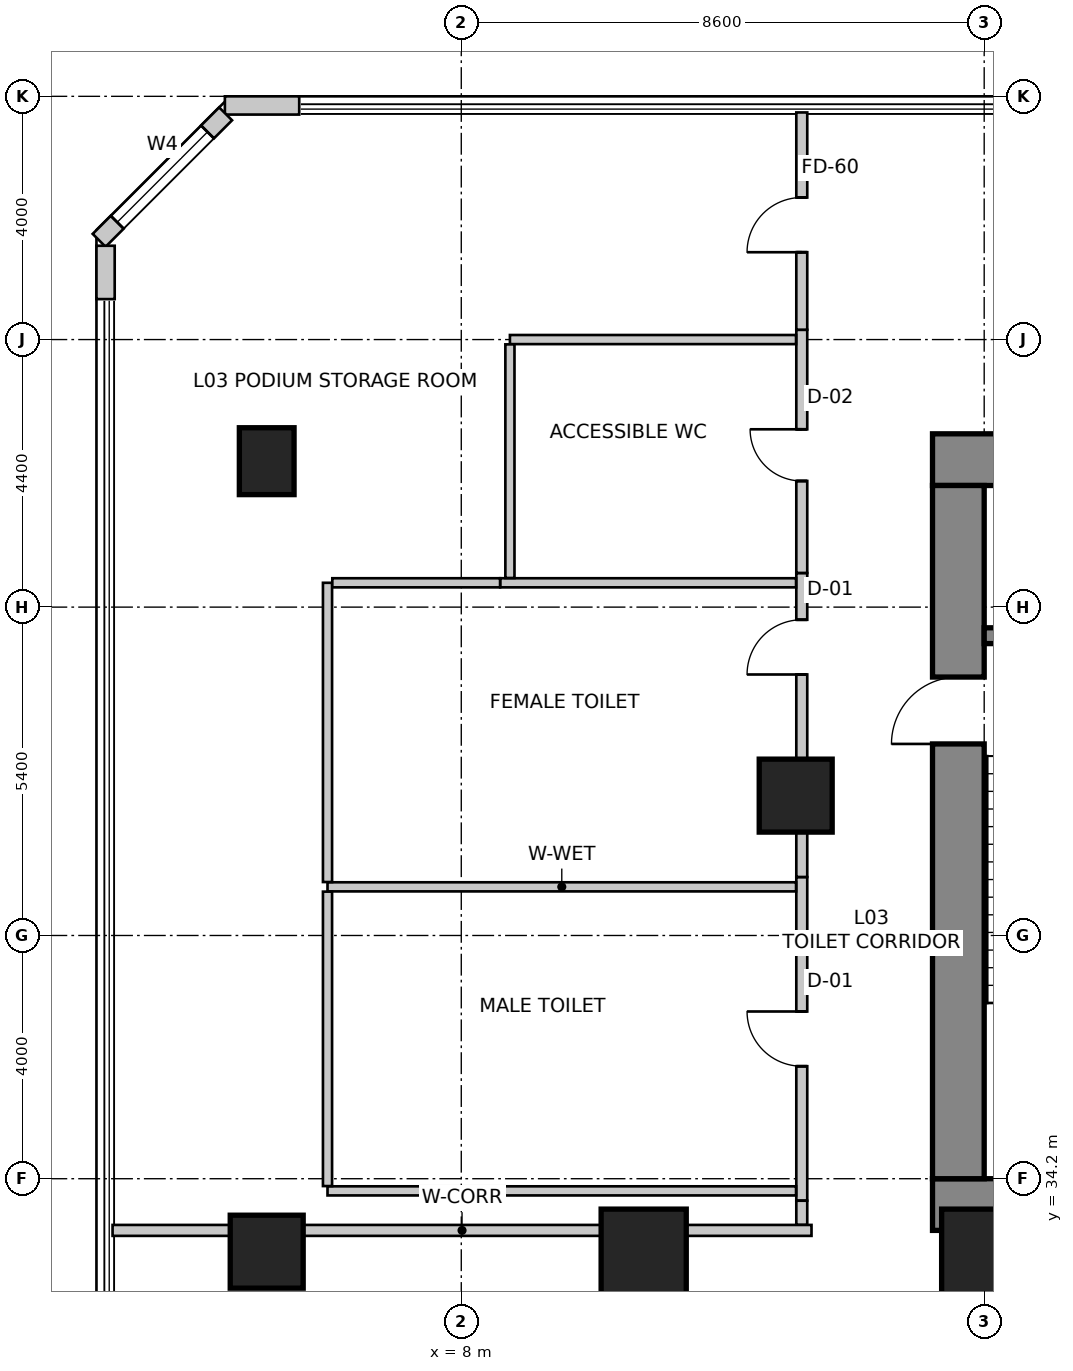
"""IFC4 building model, lengths in metres.
Left out: names, types, materials, properties, quantities, classifications, styles, units other than length and angle.
Written with IfcOpenShell. Run it as: python <this file> out.ifc"""

import sys

from ifc_helpers import new_model, si_unit, direction, frame, frame_2d, origin, origin_2d, place, context, subcontext, project, spatial, rectangle, extrude, source, transform, mapped, element, fill, save


model = new_model("IFC4")
c1 = context("Model", 3, precision=1e-05, world=origin(), true_north=direction((0.0, 1.0)))
c2 = subcontext(c1, "Body", "Model", "MODEL_VIEW")
j1 = project(units=[si_unit("LENGTHUNIT", "METRE"), si_unit("PLANEANGLEUNIT", "RADIAN")], contexts=[c1])
p1 = place(None, origin())
s1 = spatial("IfcSite", under=j1, at=p1, CompositionType="ELEMENT")
p2 = place(p1, origin())
s2 = spatial("IfcBuilding", under=s1, at=p2, CompositionType="ELEMENT")
p3 = place(p2, frame((0.0, 0.0, 11.2)))
s3 = spatial("IfcBuildingStorey", under=s2, at=p3, CompositionType="ELEMENT", Elevation=11.2)
p4 = place(p3, frame((15.75, 46.025, 0.0), z_axis=(0.0, 0.0, 1.0), x_axis=(1.0, 0.0, 0.0)))
e1 = element("IfcWall", 1, at=p4, inside=s3, PredefinedType="SHEAR", context=c2, shape_type="SweptSolid", body=[
    extrude(rectangle(XDim=16.1, YDim=0.85, at=frame_2d((8.05, 0.0))), origin(), (0.0, 0.0, 1.0), 5.2),
])
p5 = place(p3, frame((15.75, 33.775, 0.0), z_axis=(0.0, 0.0, 1.0), x_axis=(1.0, 0.0, 0.0)))
e2 = element("IfcWall", 2, at=p5, inside=s3, PredefinedType="SHEAR", context=c2, shape_type="SweptSolid", body=[
    extrude(rectangle(XDim=16.1, YDim=0.85, at=frame_2d((8.05, 0.0))), origin(), (0.0, 0.0, 1.0), 5.2),
])
m1 = source(origin(), c2, "Body", "SweptSolid", [
    extrude(rectangle(XDim=1.3, YDim=2.15, at=frame_2d((0.65, 1.075))), frame((0.0, 0.435, 0.0), z_axis=(0.0, -1.0, 0.0), x_axis=(1.0, 0.0, 0.0)), (0.0, 0.0, 1.0), 0.87),
])
p6 = place(p5, frame((10.18, 0.0, 0.0)))
e3 = element("IfcOpeningElement", 3, at=p6, cuts=e2, PredefinedType="OPENING", context=c2, shape_type="MappedRepresentation", body=[
    mapped(m1, transform((0.0, 0.0, 0.0), scale=1.0)),
])
p7 = place(p3, frame((16.175, 34.2, 0.0), z_axis=(0.0, 0.0, 1.0), x_axis=(0.0, 1.0, 0.0)))
e4 = element("IfcWall", 4, at=p7, inside=s3, PredefinedType="SHEAR", context=c2, shape_type="SweptSolid", body=[
    extrude(rectangle(XDim=11.4, YDim=0.85, at=frame_2d((5.7, 0.0))), origin(), (0.0, 0.0, 1.0), 5.2),
])
m2 = source(origin(), c2, "Body", "SweptSolid", [
    extrude(rectangle(XDim=1.1, YDim=2.15, at=frame_2d((0.55, 1.075))), frame((0.0, 0.435, 0.0), z_axis=(0.0, -1.0, 0.0), x_axis=(1.0, 0.0, 0.0)), (0.0, 0.0, 1.0), 0.87),
])
p8 = place(p7, frame((7.15, 0.0, 0.0)))
e5 = element("IfcOpeningElement", 5, at=p8, cuts=e4, PredefinedType="OPENING", context=c2, shape_type="MappedRepresentation", body=[
    mapped(m2, transform((0.0, 0.0, 0.0), scale=1.0)),
])
p9 = place(p3, frame((16.6, 43.13, 0.0), z_axis=(0.0, 0.0, 1.0), x_axis=(1.0, 0.0, 0.0)))
e6 = element("IfcWall", 6, at=p9, inside=s3, PredefinedType="SHEAR", context=c2, shape_type="SweptSolid", body=[
    extrude(rectangle(XDim=3.5, YDim=0.26, at=frame_2d((1.75, 0.0))), origin(), (0.0, 0.0, 1.0), 5.2),
])
m3 = source(origin(), c2, "Body", "SweptSolid", [
    extrude(rectangle(XDim=1.2, YDim=1.2, at=origin_2d()), origin(), (0.0, 0.0, 1.0), 5.2),
])
p10 = place(p3, frame((4.8, 33.0, 0.0), z_axis=(0.0, 0.0, 1.0), x_axis=(1.0, 0.0, 0.0)))
e7 = element("IfcColumn", 7, at=p10, inside=s3, PredefinedType="COLUMN", context=c2, shape_type="MappedRepresentation", body=[
    mapped(m3, transform((0.0, 0.0, 0.0), scale=1.0)),
])
m4 = source(origin(), c2, "Body", "SweptSolid", [
    extrude(rectangle(XDim=1.4, YDim=1.4, at=origin_2d()), origin(), (0.0, 0.0, 1.0), 5.2),
])
for number, where, z_axis, x_axis in (
    (8, (11.0, 33.0, 0.0), (0.0, 0.0, 1.0), (1.0, 0.0, 0.0)),
    (9, (16.6, 33.0, 0.0), (0.0, 0.0, 1.0), (1.0, 0.0, 0.0)),
):
    element("IfcColumn", number, at=place(p3, frame(where, z_axis=z_axis, x_axis=x_axis)), inside=s3, PredefinedType="COLUMN", context=c2, shape_type="MappedRepresentation", body=[
        mapped(m4, transform((0.0, 0.0, 0.0), scale=1.0)),
    ])
m5 = source(origin(), c2, "Body", "SweptSolid", [
    extrude(rectangle(XDim=0.9, YDim=1.1, at=origin_2d()), origin(), (0.0, 0.0, 1.0), 5.2),
])
p11 = place(p3, frame((4.8, 46.0, 0.0), z_axis=(0.0, 0.0, 1.0), x_axis=(1.0, 0.0, 0.0)))
e10 = element("IfcColumn", 10, at=p11, inside=s3, PredefinedType="COLUMN", context=c2, shape_type="MappedRepresentation", body=[
    mapped(m5, transform((0.0, 0.0, 0.0), scale=1.0)),
])
p12 = place(p3, frame((13.5, 40.5, 0.0), z_axis=(0.0, 0.0, 1.0), x_axis=(1.0, 0.0, 0.0)))
e11 = element("IfcColumn", 11, at=p12, inside=s3, PredefinedType="COLUMN", context=c2, shape_type="MappedRepresentation", body=[
    mapped(m3, transform((0.0, 0.0, 0.0), scale=1.0)),
])
p13 = place(p3, frame((5.335, 51.85, 0.0), z_axis=(0.0, 0.0, 1.0), x_axis=(-1.0, 0.0, 0.0)))
e12 = element("IfcWall", 12, at=p13, inside=s3, PredefinedType="SOLIDWALL", context=c2, shape_type="SweptSolid", body=[
    extrude(rectangle(XDim=1.223, YDim=0.3, at=frame_2d((0.611, 0.0))), origin(), (0.0, 0.0, 1.0), 4.9),
])
p14 = place(p3, frame((4.124, 51.712, 0.0), z_axis=(0.0, 0.0, 1.0), x_axis=(-0.707106781187, -0.707106781187, 0.0)))
e13 = element("IfcWall", 13, at=p14, inside=s3, PredefinedType="SOLIDWALL", context=c2, shape_type="SweptSolid", body=[
    extrude(rectangle(XDim=2.942, YDim=0.3, at=frame_2d((1.471, 0.0))), origin(), (0.0, 0.0, 1.0), 4.9),
])
m6 = source(origin(), c2, "Body", "SweptSolid", [
    extrude(rectangle(XDim=2.1, YDim=2.0, at=frame_2d((1.05, 1.0))), frame((0.0, 0.16, 0.0), z_axis=(0.0, -1.0, 0.0), x_axis=(1.0, 0.0, 0.0)), (0.0, 0.0, 1.0), 0.32),
])
p15 = place(p14, frame((0.421, 0.0, 0.85)))
e14 = element("IfcOpeningElement", 14, at=p15, cuts=e13, PredefinedType="OPENING", context=c2, shape_type="MappedRepresentation", body=[
    mapped(m6, transform((0.0, 0.0, 0.0), scale=1.0)),
])
p16 = place(p3, frame((2.15, 49.543, 0.0), z_axis=(0.0, 0.0, 1.0), x_axis=(0.0, -1.0, 0.0)))
e15 = element("IfcWall", 15, at=p16, inside=s3, PredefinedType="SOLIDWALL", context=c2, shape_type="SweptSolid", body=[
    extrude(rectangle(XDim=0.877, YDim=0.3, at=frame_2d((0.439, 0.0))), origin(), (0.0, 0.0, 1.0), 4.9),
])
p17 = place(p3, frame((2.265, 33.35, 0.0), z_axis=(0.0, 0.0, 1.0), x_axis=(1.0, 0.0, 0.0)))
e16 = element("IfcWall", 16, at=p17, inside=s3, PredefinedType="PARTITIONING", context=c2, shape_type="SweptSolid", body=[
    extrude(rectangle(XDim=11.495, YDim=0.18, at=frame_2d((5.748, 0.0))), origin(), (0.0, 0.0, 1.0), 3.692),
])
p18 = place(p3, frame((13.6, 33.84, 0.0), z_axis=(0.0, 0.0, 1.0), x_axis=(0.0, 1.0, 0.0)))
e17 = element("IfcWall", 17, at=p18, inside=s3, PredefinedType="PARTITIONING", context=c2, shape_type="SweptSolid", body=[
    extrude(rectangle(XDim=5.32, YDim=0.18, at=frame_2d((2.66, 0.0))), origin(), (0.0, 0.0, 1.0), 4.9),
])
m7 = source(origin(), c2, "Body", "SweptSolid", [
    extrude(rectangle(XDim=0.9, YDim=2.15, at=frame_2d((0.45, 1.075))), frame((0.0, 0.1, 0.0), z_axis=(0.0, -1.0, 0.0), x_axis=(1.0, 0.0, 0.0)), (0.0, 0.0, 1.0), 0.2),
])
p19 = place(p18, frame((2.21, 0.0, 0.0)))
e18 = element("IfcOpeningElement", 18, at=p19, cuts=e17, PredefinedType="OPENING", context=c2, shape_type="MappedRepresentation", body=[
    mapped(m7, transform((0.0, 0.0, 0.0), scale=1.0)),
])
p20 = place(p3, frame((13.6, 39.162, 0.0), z_axis=(0.0, 0.0, 1.0), x_axis=(0.0, 1.0, 0.0)))
e19 = element("IfcWall", 19, at=p20, inside=s3, PredefinedType="PARTITIONING", context=c2, shape_type="SweptSolid", body=[
    extrude(rectangle(XDim=4.998, YDim=0.18, at=frame_2d((2.499, 0.0))), origin(), (0.0, 0.0, 1.0), 3.942),
])
p21 = place(p20, frame((3.33, 0.0, 0.0)))
e20 = element("IfcOpeningElement", 20, at=p21, cuts=e19, PredefinedType="OPENING", context=c2, shape_type="MappedRepresentation", body=[
    mapped(m7, transform((0.0, 0.0, 0.0), scale=1.0)),
])
p22 = place(p3, frame((13.6, 44.162, 0.0), z_axis=(0.0, 0.0, 1.0), x_axis=(0.0, 1.0, 0.0)))
e21 = element("IfcWall", 21, at=p22, inside=s3, PredefinedType="PARTITIONING", context=c2, shape_type="SweptSolid", body=[
    extrude(rectangle(XDim=3.998, YDim=0.18, at=frame_2d((1.999, 0.0))), origin(), (0.0, 0.0, 1.0), 4.9),
])
m8 = source(origin(), c2, "Body", "SweptSolid", [
    extrude(rectangle(XDim=0.85, YDim=2.15, at=frame_2d((0.425, 1.075))), frame((0.0, 0.1, 0.0), z_axis=(0.0, -1.0, 0.0), x_axis=(1.0, 0.0, 0.0)), (0.0, 0.0, 1.0), 0.2),
])
p23 = place(p22, frame((1.512, 0.0, 0.0)))
e22 = element("IfcOpeningElement", 22, at=p23, cuts=e21, PredefinedType="OPENING", context=c2, shape_type="MappedRepresentation", body=[
    mapped(m8, transform((0.0, 0.0, 0.0), scale=1.0)),
])
p24 = place(p3, frame((13.6, 48.162, 0.0), z_axis=(0.0, 0.0, 1.0), x_axis=(0.0, 1.0, 0.0)))
e23 = element("IfcWall", 23, at=p24, inside=s3, PredefinedType="PARTITIONING", context=c2, shape_type="SweptSolid", body=[
    extrude(rectangle(XDim=3.573, YDim=0.18, at=frame_2d((1.787, 0.0))), origin(), (0.0, 0.0, 1.0), 4.9),
])
p25 = place(p24, frame((1.274, 0.0, 0.0)))
e24 = element("IfcOpeningElement", 24, at=p25, cuts=e23, PredefinedType="OPENING", context=c2, shape_type="MappedRepresentation", body=[
    mapped(m7, transform((0.0, 0.0, 0.0), scale=1.0)),
])
p26 = place(p3, frame((13.6, 33.444, 0.0), z_axis=(0.0, 0.0, 1.0), x_axis=(0.0, 1.0, 0.0)))
e25 = element("IfcWall", 25, at=p26, inside=s3, PredefinedType="PARTITIONING", context=c2, shape_type="SweptSolid", body=[
    extrude(rectangle(XDim=0.394, YDim=0.18, at=frame_2d((0.197, 0.0))), origin(), (0.0, 0.0, 1.0), 4.9),
])
for number, where, z_axis, x_axis in (
    (26, (5.8, 39.0, 0.0), (0.0, 0.0, 1.0), (1.0, 0.0, 0.0)),
    (27, (13.506, 34.0, 0.0), (0.0, 0.0, 1.0), (-1.0, 0.0, 0.0)),
):
    element("IfcWall", number, at=place(p3, frame(where, z_axis=z_axis, x_axis=x_axis)), inside=s3, PredefinedType="PARTITIONING", context=c2, shape_type="SweptSolid", body=[
        extrude(rectangle(XDim=7.706, YDim=0.15, at=frame_2d((3.853, 0.0))), origin(), (0.0, 0.0, 1.0), 3.942),
    ])
p27 = place(p3, frame((5.8, 34.079, 0.0), z_axis=(0.0, 0.0, 1.0), x_axis=(0.0, 1.0, 0.0)))
e28 = element("IfcWall", 28, at=p27, inside=s3, PredefinedType="PARTITIONING", context=c2, shape_type="SweptSolid", body=[
    extrude(rectangle(XDim=4.842, YDim=0.15, at=frame_2d((2.421, 0.0))), origin(), (0.0, 0.0, 1.0), 4.9),
])
p28 = place(p3, frame((8.64, 44.0, 0.0), z_axis=(0.0, 0.0, 1.0), x_axis=(1.0, 0.0, 0.0)))
e29 = element("IfcWall", 29, at=p28, inside=s3, PredefinedType="PARTITIONING", context=c2, shape_type="SweptSolid", body=[
    extrude(rectangle(XDim=4.866, YDim=0.15, at=frame_2d((2.433, 0.0))), origin(), (0.0, 0.0, 1.0), 4.9),
])
p29 = place(p3, frame((5.8, 39.079, 0.0), z_axis=(0.0, 0.0, 1.0), x_axis=(0.0, 1.0, 0.0)))
e30 = element("IfcWall", 30, at=p29, inside=s3, PredefinedType="PARTITIONING", context=c2, shape_type="SweptSolid", body=[
    extrude(rectangle(XDim=4.921, YDim=0.15, at=frame_2d((2.46, 0.0))), origin(), (0.0, 0.0, 1.0), 4.9),
])
p30 = place(p3, frame((5.879, 44.0, 0.0), z_axis=(0.0, 0.0, 1.0), x_axis=(1.0, 0.0, 0.0)))
e31 = element("IfcWall", 31, at=p30, inside=s3, PredefinedType="PARTITIONING", context=c2, shape_type="SweptSolid", body=[
    extrude(rectangle(XDim=2.759, YDim=0.15, at=frame_2d((1.379, 0.0))), origin(), (0.0, 0.0, 1.0), 3.942),
])
p31 = place(p3, frame((8.8, 48.0, 0.0), z_axis=(0.0, 0.0, 1.0), x_axis=(1.0, 0.0, 0.0)))
e32 = element("IfcWall", 32, at=p31, inside=s3, PredefinedType="PARTITIONING", context=c2, shape_type="SweptSolid", body=[
    extrude(rectangle(XDim=4.706, YDim=0.15, at=frame_2d((2.353, 0.0))), origin(), (0.0, 0.0, 1.0), 4.9),
])
p32 = place(p3, frame((8.8, 44.079, 0.0), z_axis=(0.0, 0.0, 1.0), x_axis=(0.0, 1.0, 0.0)))
e33 = element("IfcWall", 33, at=p32, inside=s3, PredefinedType="PARTITIONING", context=c2, shape_type="SweptSolid", body=[
    extrude(rectangle(XDim=3.842, YDim=0.15, at=frame_2d((1.921, 0.0))), origin(), (0.0, 0.0, 1.0), 4.9),
])
m9 = source(origin(), c2, "Body", "SweptSolid", [
    extrude(rectangle(XDim=2.1, YDim=2.0, at=frame_2d((1.05, 1.0))), frame((0.0, -0.015, 0.0), z_axis=(0.0, -1.0, 0.0), x_axis=(1.0, 0.0, 0.0)), (0.0, 0.0, 1.0), 0.06),
])
p33 = place(p15, origin())
e34 = element("IfcWindow", 34, at=p33, inside=s3, PartitioningType="SINGLE_PANEL", PredefinedType="WINDOW", context=c2, shape_type="MappedRepresentation", body=[
    mapped(m9, transform((0.0, 0.0, 0.0), scale=1.0)),
])
fill(e14, e34)
m10 = source(origin(), c2, "Body", "SweptSolid", [
    extrude(rectangle(XDim=1.1, YDim=2.15, at=frame_2d((0.55, 1.075))), frame((0.0, 0.025, 0.0), z_axis=(0.0, -1.0, 0.0), x_axis=(1.0, 0.0, 0.0)), (0.0, 0.0, 1.0), 0.05),
])
p34 = place(p8, origin())
e35 = element("IfcDoor", 35, at=p34, inside=s3, OperationType="SINGLE_SWING_LEFT", PredefinedType="DOOR", context=c2, shape_type="MappedRepresentation", body=[
    mapped(m10, transform((0.0, 0.0, 0.0), scale=1.0)),
])
fill(e5, e35)
m11 = source(origin(), c2, "Body", "SweptSolid", [
    extrude(rectangle(XDim=0.9, YDim=2.15, at=frame_2d((0.45, 1.075))), frame((0.0, 0.025, 0.0), z_axis=(0.0, -1.0, 0.0), x_axis=(1.0, 0.0, 0.0)), (0.0, 0.0, 1.0), 0.05),
])
p35 = place(p19, origin())
e36 = element("IfcDoor", 36, at=p35, inside=s3, OperationType="SINGLE_SWING_RIGHT", PredefinedType="DOOR", context=c2, shape_type="MappedRepresentation", body=[
    mapped(m11, transform((0.0, 0.0, 0.0), scale=1.0)),
])
fill(e18, e36)
p36 = place(p21, origin())
e37 = element("IfcDoor", 37, at=p36, inside=s3, OperationType="SINGLE_SWING_LEFT", PredefinedType="DOOR", context=c2, shape_type="MappedRepresentation", body=[
    mapped(m11, transform((0.0, 0.0, 0.0), scale=1.0)),
])
fill(e20, e37)
m12 = source(origin(), c2, "Body", "SweptSolid", [
    extrude(rectangle(XDim=0.85, YDim=2.15, at=frame_2d((0.425, 1.075))), frame((0.0, 0.025, 0.0), z_axis=(0.0, -1.0, 0.0), x_axis=(1.0, 0.0, 0.0)), (0.0, 0.0, 1.0), 0.05),
])
p37 = place(p23, origin())
e38 = element("IfcDoor", 38, at=p37, inside=s3, OperationType="SINGLE_SWING_RIGHT", PredefinedType="DOOR", context=c2, shape_type="MappedRepresentation", body=[
    mapped(m12, transform((0.0, 0.0, 0.0), scale=1.0)),
])
fill(e22, e38)
m13 = source(origin(), c2, "Body", "SweptSolid", [
    extrude(rectangle(XDim=0.9, YDim=2.15, at=frame_2d((0.45, 1.075))), frame((0.0, 0.025, 0.0), z_axis=(0.0, -1.0, 0.0), x_axis=(1.0, 0.0, 0.0)), (0.0, 0.0, 1.0), 0.05),
])
p38 = place(p25, origin())
e39 = element("IfcDoor", 39, at=p38, inside=s3, OperationType="SINGLE_SWING_LEFT", PredefinedType="DOOR", context=c2, shape_type="MappedRepresentation", body=[
    mapped(m13, transform((0.0, 0.0, 0.0), scale=1.0)),
])
fill(e24, e39)
save(model, sys.argv[1])
